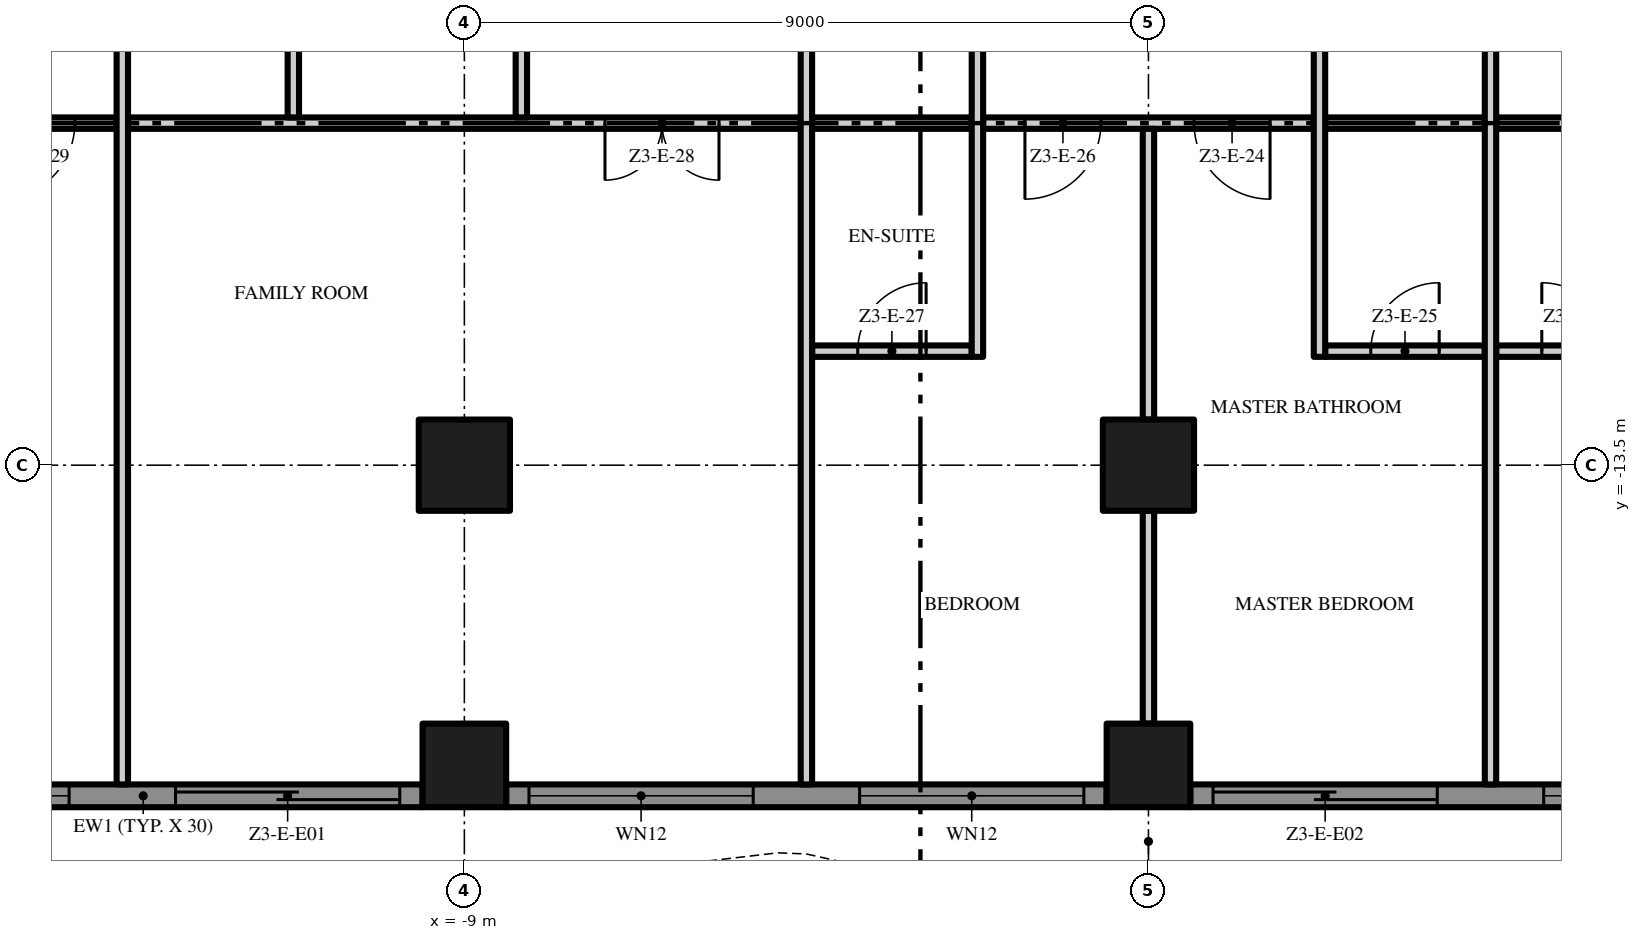
"""IFC4 building model, lengths in metres.
Left out: names, types, materials, properties, quantities, classifications, styles, units other than length and angle.
Written with IfcOpenShell. Run it as: python <this file> out.ifc"""

import sys

from ifc_helpers import new_model, si_unit, direction, frame, frame_2d, origin, origin_2d, place, context, subcontext, project, spatial, polyline, rectangle, outline, extrude, element, fill, save


model = new_model("IFC4")
c1 = context("Model", 3, precision=1e-05, world=origin(), true_north=direction((0.0, 1.0)))
c2 = subcontext(c1, "Body", "Model", "MODEL_VIEW")
j1 = project(units=[si_unit("LENGTHUNIT", "METRE"), si_unit("PLANEANGLEUNIT", "RADIAN")], contexts=[c1])
p1 = place(None, origin())
s1 = spatial("IfcSite", under=j1, at=p1, CompositionType="ELEMENT")
p2 = place(p1, origin())
s2 = spatial("IfcBuilding", under=s1, at=p2, CompositionType="ELEMENT")
p3 = place(p2, frame((0.0, 0.0, 170.6)))
s3 = spatial("IfcBuildingStorey", under=s2, at=p3, CompositionType="ELEMENT", Elevation=170.6)
p4 = place(p3, frame((-9.0, -13.5, 0.0), z_axis=(0.0, 0.0, 1.0), x_axis=(1.0, 0.0, 0.0)))
e1 = element("IfcColumn", 1, at=p4, inside=s3, PredefinedType="COLUMN", context=c2, shape_type="SweptSolid", body=[
    extrude(rectangle(XDim=1.2, YDim=1.2, at=origin_2d()), origin(), (0.0, 0.0, 1.0), 3.5),
])
p5 = place(p3, frame((-9.0, -17.45, 0.0), z_axis=(0.0, 0.0, 1.0), x_axis=(1.0, 0.0, 0.0)))
e2 = element("IfcColumn", 2, at=p5, inside=s3, PredefinedType="COLUMN", context=c2, shape_type="SweptSolid", body=[
    extrude(rectangle(XDim=1.1, YDim=1.1, at=origin_2d()), origin(), (0.0, 0.0, 1.0), 3.5),
])
p6 = place(p3, frame((0.0, -13.5, 0.0), z_axis=(0.0, 0.0, 1.0), x_axis=(1.0, 0.0, 0.0)))
e3 = element("IfcColumn", 3, at=p6, inside=s3, PredefinedType="COLUMN", context=c2, shape_type="SweptSolid", body=[
    extrude(rectangle(XDim=1.2, YDim=1.2, at=origin_2d()), origin(), (0.0, 0.0, 1.0), 3.5),
])
p7 = place(p3, frame((0.0, -17.45, 0.0), z_axis=(0.0, 0.0, 1.0), x_axis=(1.0, 0.0, 0.0)))
e4 = element("IfcColumn", 4, at=p7, inside=s3, PredefinedType="COLUMN", context=c2, shape_type="SweptSolid", body=[
    extrude(rectangle(XDim=1.1, YDim=1.1, at=origin_2d()), origin(), (0.0, 0.0, 1.0), 3.5),
])
p8 = place(p3, frame((-9.55, -17.85, 0.0), z_axis=(0.0, 0.0, 1.0), x_axis=(-1.0, 0.0, 0.0)))
e5 = element("IfcWall", 5, at=p8, inside=s3, PredefinedType="SOLIDWALL", context=c2, shape_type="SweptSolid", body=[
    extrude(rectangle(XDim=7.35, YDim=0.3, at=frame_2d((3.675, 0.0))), origin(), (0.0, 0.0, 1.0), 3.5),
])
p9 = place(p8, frame((4.65, 0.0, 0.45)))
e6 = element("IfcOpeningElement", 6, at=p9, cuts=e5, PredefinedType="OPENING", context=c2, shape_type="SweptSolid", body=[
    extrude(rectangle(XDim=2.4, YDim=2.65, at=frame_2d((1.2, 1.325))), frame((0.0, 0.16, 0.0), z_axis=(0.0, -1.0, 0.0), x_axis=(1.0, 0.0, 0.0)), (0.0, 0.0, 1.0), 0.32),
])
p10 = place(p8, frame((0.3, 0.0, 0.0)))
e7 = element("IfcOpeningElement", 7, at=p10, cuts=e5, PredefinedType="OPENING", context=c2, shape_type="SweptSolid", body=[
    extrude(rectangle(XDim=2.95, YDim=2.4, at=frame_2d((1.475, 1.2))), frame((0.0, 0.16, 0.0), z_axis=(0.0, -1.0, 0.0), x_axis=(1.0, 0.0, 0.0)), (0.0, 0.0, 1.0), 0.32),
])
p11 = place(p3, frame((-0.55, -17.85, 0.0), z_axis=(0.0, 0.0, 1.0), x_axis=(-1.0, 0.0, 0.0)))
e8 = element("IfcWall", 8, at=p11, inside=s3, PredefinedType="SOLIDWALL", context=c2, shape_type="SweptSolid", body=[
    extrude(rectangle(XDim=7.9, YDim=0.3, at=frame_2d((3.95, 0.0))), origin(), (0.0, 0.0, 1.0), 3.5),
])
p12 = place(p11, frame((4.65, 0.0, 0.45)))
e9 = element("IfcOpeningElement", 9, at=p12, cuts=e8, PredefinedType="OPENING", context=c2, shape_type="SweptSolid", body=[
    extrude(rectangle(XDim=2.95, YDim=2.65, at=frame_2d((1.475, 1.325))), frame((0.0, 0.16, 0.0), z_axis=(0.0, -1.0, 0.0), x_axis=(1.0, 0.0, 0.0)), (0.0, 0.0, 1.0), 0.32),
])
p13 = place(p11, frame((0.3, 0.0, 0.45)))
e10 = element("IfcOpeningElement", 10, at=p13, cuts=e8, PredefinedType="OPENING", context=c2, shape_type="SweptSolid", body=[
    extrude(rectangle(XDim=2.95, YDim=2.65, at=frame_2d((1.475, 1.325))), frame((0.0, 0.16, 0.0), z_axis=(0.0, -1.0, 0.0), x_axis=(1.0, 0.0, 0.0)), (0.0, 0.0, 1.0), 0.32),
])
p14 = place(p3, frame((8.45, -17.85, 0.0), z_axis=(0.0, 0.0, 1.0), x_axis=(-1.0, 0.0, 0.0)))
e11 = element("IfcWall", 11, at=p14, inside=s3, PredefinedType="SOLIDWALL", context=c2, shape_type="SweptSolid", body=[
    extrude(rectangle(XDim=7.9, YDim=0.3, at=frame_2d((3.95, 0.0))), origin(), (0.0, 0.0, 1.0), 3.5),
])
p15 = place(p14, frame((4.65, 0.0, 0.0)))
e12 = element("IfcOpeningElement", 12, at=p15, cuts=e11, PredefinedType="OPENING", context=c2, shape_type="SweptSolid", body=[
    extrude(rectangle(XDim=2.95, YDim=2.4, at=frame_2d((1.475, 1.2))), frame((0.0, 0.16, 0.0), z_axis=(0.0, -1.0, 0.0), x_axis=(1.0, 0.0, 0.0)), (0.0, 0.0, 1.0), 0.32),
])
p16 = place(p14, frame((0.3, 0.0, 0.45)))
e13 = element("IfcOpeningElement", 13, at=p16, cuts=e11, PredefinedType="OPENING", context=c2, shape_type="SweptSolid", body=[
    extrude(rectangle(XDim=2.95, YDim=2.65, at=frame_2d((1.475, 1.325))), frame((0.0, 0.16, 0.0), z_axis=(0.0, -1.0, 0.0), x_axis=(1.0, 0.0, 0.0)), (0.0, 0.0, 1.0), 0.32),
])
p17 = place(p3, origin())
e14 = element("IfcWall", 14, at=p17, inside=s3, PredefinedType="USERDEFINED", context=c2, shape_type="SweptSolid", body=[
    extrude(outline(polyline([(-18.0, -18.951), (-16.5, -19.612), (-15.0, -20.345), (-13.5, -20.869), (-12.375, -21.0), (-12.0, -20.985), (-10.5, -20.649), (-9.0, -19.988), (-7.5, -19.255), (-6.0, -18.731), (-4.875, -18.6), (-4.5, -18.615), (-3.0, -18.951), (-1.5, -19.612), (0.0, -20.345), (1.5, -20.869), (2.625, -21.0), (3.0, -20.985), (4.5, -20.649), (6.0, -19.988), (7.5, -19.255), (9.0, -18.731), (10.125, -18.6), (10.5, -18.615), (12.0, -18.951), (13.5, -19.612), (15.0, -20.345), (16.5, -20.869), (17.625, -21.0), (18.0, -20.985), (17.99, -20.735), (17.635, -20.749), (16.556, -20.624), (15.096, -20.114), (13.605, -19.385), (12.079, -18.713), (10.533, -18.366), (10.115, -18.349), (8.944, -18.486), (7.404, -19.024), (5.895, -19.761), (4.421, -20.41), (2.967, -20.736), (2.635, -20.749), (1.556, -20.624), (0.096, -20.114), (-1.395, -19.385), (-2.921, -18.713), (-4.467, -18.366), (-4.885, -18.349), (-6.056, -18.486), (-7.596, -19.024), (-9.105, -19.761), (-10.579, -20.41), (-12.033, -20.736), (-12.365, -20.749), (-13.444, -20.624), (-14.904, -20.114), (-16.395, -19.385), (-17.899, -18.723), (-18.0, -18.951)])), origin(), (0.0, 0.0, 1.0), 0.9),
])
p18 = place(p3, frame((-4.425, -12.0, 0.0), z_axis=(0.0, 0.0, 1.0), x_axis=(1.0, 0.0, 0.0)))
e15 = element("IfcWall", 15, at=p18, inside=s3, PredefinedType="PARTITIONING", context=c2, shape_type="SweptSolid", body=[
    extrude(rectangle(XDim=2.1, YDim=0.15, at=frame_2d((1.05, 0.0))), origin(), (0.0, 0.0, 1.0), 3.5),
])
p19 = place(p18, frame((0.6, 0.0, 0.0)))
e16 = element("IfcOpeningElement", 16, at=p19, cuts=e15, PredefinedType="OPENING", context=c2, shape_type="SweptSolid", body=[
    extrude(rectangle(XDim=0.9, YDim=2.1, at=frame_2d((0.45, 1.05))), frame((0.0, 0.085, 0.0), z_axis=(0.0, -1.0, 0.0), x_axis=(1.0, 0.0, 0.0)), (0.0, 0.0, 1.0), 0.17),
])
p20 = place(p3, frame((2.325, -12.0, 0.0), z_axis=(0.0, 0.0, 1.0), x_axis=(1.0, 0.0, 0.0)))
e17 = element("IfcWall", 17, at=p20, inside=s3, PredefinedType="PARTITIONING", context=c2, shape_type="SweptSolid", body=[
    extrude(rectangle(XDim=2.1, YDim=0.15, at=frame_2d((1.05, 0.0))), origin(), (0.0, 0.0, 1.0), 3.5),
])
p21 = place(p20, frame((0.6, 0.0, 0.0)))
e18 = element("IfcOpeningElement", 18, at=p21, cuts=e17, PredefinedType="OPENING", context=c2, shape_type="SweptSolid", body=[
    extrude(rectangle(XDim=0.9, YDim=2.1, at=frame_2d((0.45, 1.05))), frame((0.0, 0.085, 0.0), z_axis=(0.0, -1.0, 0.0), x_axis=(1.0, 0.0, 0.0)), (0.0, 0.0, 1.0), 0.17),
])
p22 = place(p3, frame((4.575, -12.0, 0.0), z_axis=(0.0, 0.0, 1.0), x_axis=(1.0, 0.0, 0.0)))
e19 = element("IfcWall", 19, at=p22, inside=s3, PredefinedType="PARTITIONING", context=c2, shape_type="SweptSolid", body=[
    extrude(rectangle(XDim=2.1, YDim=0.15, at=frame_2d((1.05, 0.0))), origin(), (0.0, 0.0, 1.0), 3.5),
])
p23 = place(p22, frame((0.6, 0.0, 0.0)))
e20 = element("IfcOpeningElement", 20, at=p23, cuts=e19, PredefinedType="OPENING", context=c2, shape_type="SweptSolid", body=[
    extrude(rectangle(XDim=0.9, YDim=2.1, at=frame_2d((0.45, 1.05))), frame((0.0, 0.085, 0.0), z_axis=(0.0, -1.0, 0.0), x_axis=(1.0, 0.0, 0.0)), (0.0, 0.0, 1.0), 0.17),
])
p24 = place(p3, frame((-13.575, -9.0, 0.0), z_axis=(0.0, 0.0, 1.0), x_axis=(-1.0, 0.0, 0.0)))
e21 = element("IfcWall", 21, at=p24, inside=s3, PredefinedType="PARTITIONING", context=c2, shape_type="SweptSolid", body=[
    extrude(rectangle(XDim=2.1, YDim=0.15, at=frame_2d((1.05, 0.0))), origin(), (0.0, 0.0, 1.0), 3.5),
])
p25 = place(p24, frame((0.55, 0.0, 0.0)))
e22 = element("IfcOpeningElement", 22, at=p25, cuts=e21, PredefinedType="OPENING", context=c2, shape_type="SweptSolid", body=[
    extrude(rectangle(XDim=1.0, YDim=2.4, at=frame_2d((0.5, 1.2))), frame((0.0, 0.085, 0.0), z_axis=(0.0, -1.0, 0.0), x_axis=(1.0, 0.0, 0.0)), (0.0, 0.0, 1.0), 0.17),
])
p26 = place(p3, frame((-4.575, -9.0, 0.0), z_axis=(0.0, 0.0, 1.0), x_axis=(-1.0, 0.0, 0.0)))
e23 = element("IfcWall", 23, at=p26, inside=s3, PredefinedType="PARTITIONING", context=c2, shape_type="SweptSolid", body=[
    extrude(rectangle(XDim=8.85, YDim=0.15, at=frame_2d((4.425, 0.0))), origin(), (0.0, 0.0, 1.0), 3.5),
])
p27 = place(p26, frame((1.075, 0.0, 0.0)))
e24 = element("IfcOpeningElement", 24, at=p27, cuts=e23, PredefinedType="OPENING", context=c2, shape_type="SweptSolid", body=[
    extrude(rectangle(XDim=1.5, YDim=2.4, at=frame_2d((0.75, 1.2))), frame((0.0, 0.085, 0.0), z_axis=(0.0, -1.0, 0.0), x_axis=(1.0, 0.0, 0.0)), (0.0, 0.0, 1.0), 0.17),
])
p28 = place(p3, frame((-4.425, -9.0, 0.0), z_axis=(0.0, 0.0, 1.0), x_axis=(1.0, 0.0, 0.0)))
e25 = element("IfcWall", 25, at=p28, inside=s3, PredefinedType="PARTITIONING", context=c2, shape_type="SweptSolid", body=[
    extrude(rectangle(XDim=2.1, YDim=0.15, at=frame_2d((1.05, 0.0))), origin(), (0.0, 0.0, 1.0), 3.5),
])
p29 = place(p3, frame((2.175, -9.0, 0.0), z_axis=(0.0, 0.0, 1.0), x_axis=(-1.0, 0.0, 0.0)))
e26 = element("IfcWall", 26, at=p29, inside=s3, PredefinedType="PARTITIONING", context=c2, shape_type="SweptSolid", body=[
    extrude(rectangle(XDim=4.35, YDim=0.15, at=frame_2d((2.175, 0.0))), origin(), (0.0, 0.0, 1.0), 3.5),
])
p30 = place(p29, frame((0.575, 0.0, 0.0)))
e27 = element("IfcOpeningElement", 27, at=p30, cuts=e26, PredefinedType="OPENING", context=c2, shape_type="SweptSolid", body=[
    extrude(rectangle(XDim=1.0, YDim=2.4, at=frame_2d((0.5, 1.2))), frame((0.0, 0.085, 0.0), z_axis=(0.0, -1.0, 0.0), x_axis=(1.0, 0.0, 0.0)), (0.0, 0.0, 1.0), 0.17),
])
p31 = place(p29, frame((2.8, 0.0, 0.0)))
e28 = element("IfcOpeningElement", 28, at=p31, cuts=e26, PredefinedType="OPENING", context=c2, shape_type="SweptSolid", body=[
    extrude(rectangle(XDim=1.0, YDim=2.4, at=frame_2d((0.5, 1.2))), frame((0.0, 0.085, 0.0), z_axis=(0.0, -1.0, 0.0), x_axis=(1.0, 0.0, 0.0)), (0.0, 0.0, 1.0), 0.17),
])
for number, where, z_axis, x_axis in (
    (29, (2.325, -9.0, 0.0), (0.0, 0.0, 1.0), (1.0, 0.0, 0.0)),
    (30, (4.575, -9.0, 0.0), (0.0, 0.0, 1.0), (1.0, 0.0, 0.0)),
):
    element("IfcWall", number, at=place(p3, frame(where, z_axis=z_axis, x_axis=x_axis)), inside=s3, PredefinedType="PARTITIONING", context=c2, shape_type="SweptSolid", body=[
        extrude(rectangle(XDim=2.1, YDim=0.15, at=frame_2d((1.05, 0.0))), origin(), (0.0, 0.0, 1.0), 3.5),
    ])
p32 = place(p3, frame((-13.5, -17.7, 0.0), z_axis=(0.0, 0.0, 1.0), x_axis=(0.0, 1.0, 0.0)))
e31 = element("IfcWall", 31, at=p32, inside=s3, PredefinedType="PARTITIONING", context=c2, shape_type="SweptSolid", body=[
    extrude(rectangle(XDim=13.275, YDim=0.15, at=frame_2d((6.638, 0.0))), origin(), (0.0, 0.0, 1.0), 3.5),
])
p33 = place(p3, frame((-11.25, -8.925, 0.0), z_axis=(0.0, 0.0, 1.0), x_axis=(0.0, 1.0, 0.0)))
e32 = element("IfcWall", 32, at=p33, inside=s3, PredefinedType="PARTITIONING", context=c2, shape_type="SweptSolid", body=[
    extrude(rectangle(XDim=4.35, YDim=0.15, at=frame_2d((2.175, 0.0))), origin(), (0.0, 0.0, 1.0), 3.5),
])
p34 = place(p3, frame((-8.25, -8.925, 0.0), z_axis=(0.0, 0.0, 1.0), x_axis=(0.0, 1.0, 0.0)))
e33 = element("IfcWall", 33, at=p34, inside=s3, PredefinedType="PARTITIONING", context=c2, shape_type="SweptSolid", body=[
    extrude(rectangle(XDim=4.5, YDim=0.15, at=frame_2d((2.25, 0.0))), origin(), (0.0, 0.0, 1.0), 3.5),
])
p35 = place(p3, frame((-4.5, -17.7, 0.0), z_axis=(0.0, 0.0, 1.0), x_axis=(0.0, 1.0, 0.0)))
e34 = element("IfcWall", 34, at=p35, inside=s3, PredefinedType="PARTITIONING", context=c2, shape_type="SweptSolid", body=[
    extrude(rectangle(XDim=13.275, YDim=0.15, at=frame_2d((6.638, 0.0))), origin(), (0.0, 0.0, 1.0), 3.5),
])
p36 = place(p3, frame((-2.25, -12.075, 0.0), z_axis=(0.0, 0.0, 1.0), x_axis=(0.0, 1.0, 0.0)))
e35 = element("IfcWall", 35, at=p36, inside=s3, PredefinedType="PARTITIONING", context=c2, shape_type="SweptSolid", body=[
    extrude(rectangle(XDim=7.65, YDim=0.15, at=frame_2d((3.825, 0.0))), origin(), (0.0, 0.0, 1.0), 3.5),
])
p37 = place(p3, frame((0.0, -16.9, 0.0), z_axis=(0.0, 0.0, 1.0), x_axis=(0.0, 1.0, 0.0)))
e36 = element("IfcWall", 36, at=p37, inside=s3, PredefinedType="PARTITIONING", context=c2, shape_type="SweptSolid", body=[
    extrude(rectangle(XDim=2.8, YDim=0.15, at=frame_2d((1.4, 0.0))), origin(), (0.0, 0.0, 1.0), 3.5),
])
p38 = place(p3, frame((0.0, -12.9, 0.0), z_axis=(0.0, 0.0, 1.0), x_axis=(0.0, 1.0, 0.0)))
e37 = element("IfcWall", 37, at=p38, inside=s3, PredefinedType="PARTITIONING", context=c2, shape_type="SweptSolid", body=[
    extrude(rectangle(XDim=3.825, YDim=0.15, at=frame_2d((1.913, 0.0))), origin(), (0.0, 0.0, 1.0), 3.5),
])
p39 = place(p3, frame((2.25, -4.425, 0.0), z_axis=(0.0, 0.0, 1.0), x_axis=(0.0, -1.0, 0.0)))
e38 = element("IfcWall", 38, at=p39, inside=s3, PredefinedType="PARTITIONING", context=c2, shape_type="SweptSolid", body=[
    extrude(rectangle(XDim=7.65, YDim=0.15, at=frame_2d((3.825, 0.0))), origin(), (0.0, 0.0, 1.0), 3.5),
])
p40 = place(p39, frame((1.875, 0.0, 0.0)))
e39 = element("IfcOpeningElement", 39, at=p40, cuts=e38, PredefinedType="OPENING", context=c2, shape_type="SweptSolid", body=[
    extrude(rectangle(XDim=0.9, YDim=2.1, at=frame_2d((0.45, 1.05))), frame((0.0, 0.085, 0.0), z_axis=(0.0, -1.0, 0.0), x_axis=(1.0, 0.0, 0.0)), (0.0, 0.0, 1.0), 0.17),
])
p41 = place(p3, frame((4.5, -17.7, 0.0), z_axis=(0.0, 0.0, 1.0), x_axis=(0.0, 1.0, 0.0)))
e40 = element("IfcWall", 40, at=p41, inside=s3, PredefinedType="PARTITIONING", context=c2, shape_type="SweptSolid", body=[
    extrude(rectangle(XDim=13.125, YDim=0.15, at=frame_2d((6.562, 0.0))), origin(), (0.0, 0.0, 1.0), 3.5),
])
p42 = place(p9, origin())
e41 = element("IfcWindow", 41, at=p42, inside=s3, PartitioningType="SINGLE_PANEL", PredefinedType="WINDOW", context=c2, shape_type="SweptSolid", body=[
    extrude(rectangle(XDim=2.4, YDim=2.65, at=frame_2d((1.2, 1.325))), frame((0.0, 0.03, 0.0), z_axis=(0.0, -1.0, 0.0), x_axis=(1.0, 0.0, 0.0)), (0.0, 0.0, 1.0), 0.06),
])
fill(e6, e41)
p43 = place(p10, origin())
e42 = element("IfcDoor", 42, at=p43, inside=s3, OperationType="SINGLE_SWING_LEFT", PredefinedType="DOOR", context=c2, shape_type="SweptSolid", body=[
    extrude(rectangle(XDim=2.95, YDim=2.4, at=frame_2d((1.475, 1.2))), frame((0.0, 0.025, 0.0), z_axis=(0.0, -1.0, 0.0), x_axis=(1.0, 0.0, 0.0)), (0.0, 0.0, 1.0), 0.05),
])
fill(e7, e42)
p44 = place(p12, origin())
e43 = element("IfcWindow", 43, at=p44, inside=s3, PartitioningType="SINGLE_PANEL", PredefinedType="WINDOW", context=c2, shape_type="SweptSolid", body=[
    extrude(rectangle(XDim=2.95, YDim=2.65, at=frame_2d((1.475, 1.325))), frame((0.0, 0.03, 0.0), z_axis=(0.0, -1.0, 0.0), x_axis=(1.0, 0.0, 0.0)), (0.0, 0.0, 1.0), 0.06),
])
fill(e9, e43)
p45 = place(p13, origin())
e44 = element("IfcWindow", 44, at=p45, inside=s3, PartitioningType="SINGLE_PANEL", PredefinedType="WINDOW", context=c2, shape_type="SweptSolid", body=[
    extrude(rectangle(XDim=2.95, YDim=2.65, at=frame_2d((1.475, 1.325))), frame((0.0, 0.03, 0.0), z_axis=(0.0, -1.0, 0.0), x_axis=(1.0, 0.0, 0.0)), (0.0, 0.0, 1.0), 0.06),
])
fill(e10, e44)
p46 = place(p15, origin())
e45 = element("IfcDoor", 45, at=p46, inside=s3, OperationType="SINGLE_SWING_LEFT", PredefinedType="DOOR", context=c2, shape_type="SweptSolid", body=[
    extrude(rectangle(XDim=2.95, YDim=2.4, at=frame_2d((1.475, 1.2))), frame((0.0, 0.025, 0.0), z_axis=(0.0, -1.0, 0.0), x_axis=(1.0, 0.0, 0.0)), (0.0, 0.0, 1.0), 0.05),
])
fill(e12, e45)
p47 = place(p16, origin())
e46 = element("IfcWindow", 46, at=p47, inside=s3, PartitioningType="SINGLE_PANEL", PredefinedType="WINDOW", context=c2, shape_type="SweptSolid", body=[
    extrude(rectangle(XDim=2.95, YDim=2.65, at=frame_2d((1.475, 1.325))), frame((0.0, 0.03, 0.0), z_axis=(0.0, -1.0, 0.0), x_axis=(1.0, 0.0, 0.0)), (0.0, 0.0, 1.0), 0.06),
])
fill(e13, e46)
p48 = place(p23, origin())
e47 = element("IfcDoor", 47, at=p48, inside=s3, OperationType="SINGLE_SWING_LEFT", PredefinedType="DOOR", context=c2, shape_type="SweptSolid", body=[
    extrude(rectangle(XDim=0.9, YDim=2.1, at=frame_2d((0.45, 1.05))), frame((0.0, 0.025, 0.0), z_axis=(0.0, -1.0, 0.0), x_axis=(1.0, 0.0, 0.0)), (0.0, 0.0, 1.0), 0.05),
])
fill(e20, e47)
p49 = place(p30, origin())
e48 = element("IfcDoor", 48, at=p49, inside=s3, OperationType="SINGLE_SWING_LEFT", PredefinedType="DOOR", context=c2, shape_type="SweptSolid", body=[
    extrude(rectangle(XDim=1.0, YDim=2.4, at=frame_2d((0.5, 1.2))), frame((0.0, 0.025, 0.0), z_axis=(0.0, -1.0, 0.0), x_axis=(1.0, 0.0, 0.0)), (0.0, 0.0, 1.0), 0.05),
])
fill(e27, e48)
p50 = place(p21, origin())
e49 = element("IfcDoor", 49, at=p50, inside=s3, OperationType="SINGLE_SWING_RIGHT", PredefinedType="DOOR", context=c2, shape_type="SweptSolid", body=[
    extrude(rectangle(XDim=0.9, YDim=2.1, at=frame_2d((0.45, 1.05))), frame((0.0, 0.025, 0.0), z_axis=(0.0, -1.0, 0.0), x_axis=(1.0, 0.0, 0.0)), (0.0, 0.0, 1.0), 0.05),
])
fill(e18, e49)
p51 = place(p31, origin())
e50 = element("IfcDoor", 50, at=p51, inside=s3, OperationType="SINGLE_SWING_RIGHT", PredefinedType="DOOR", context=c2, shape_type="SweptSolid", body=[
    extrude(rectangle(XDim=1.0, YDim=2.4, at=frame_2d((0.5, 1.2))), frame((0.0, 0.025, 0.0), z_axis=(0.0, -1.0, 0.0), x_axis=(1.0, 0.0, 0.0)), (0.0, 0.0, 1.0), 0.05),
])
fill(e28, e50)
p52 = place(p19, origin())
e51 = element("IfcDoor", 51, at=p52, inside=s3, OperationType="SINGLE_SWING_RIGHT", PredefinedType="DOOR", context=c2, shape_type="SweptSolid", body=[
    extrude(rectangle(XDim=0.9, YDim=2.1, at=frame_2d((0.45, 1.05))), frame((0.0, 0.025, 0.0), z_axis=(0.0, -1.0, 0.0), x_axis=(1.0, 0.0, 0.0)), (0.0, 0.0, 1.0), 0.05),
])
fill(e16, e51)
p53 = place(p27, origin())
e52 = element("IfcDoor", 52, at=p53, inside=s3, OperationType="DOUBLE_DOOR_SINGLE_SWING", PredefinedType="DOOR", context=c2, shape_type="SweptSolid", body=[
    extrude(rectangle(XDim=1.5, YDim=2.4, at=frame_2d((0.75, 1.2))), frame((0.0, 0.025, 0.0), z_axis=(0.0, -1.0, 0.0), x_axis=(1.0, 0.0, 0.0)), (0.0, 0.0, 1.0), 0.05),
])
fill(e24, e52)
p54 = place(p25, origin())
e53 = element("IfcDoor", 53, at=p54, inside=s3, OperationType="SINGLE_SWING_RIGHT", PredefinedType="DOOR", context=c2, shape_type="SweptSolid", body=[
    extrude(rectangle(XDim=1.0, YDim=2.4, at=frame_2d((0.5, 1.2))), frame((0.0, 0.025, 0.0), z_axis=(0.0, -1.0, 0.0), x_axis=(1.0, 0.0, 0.0)), (0.0, 0.0, 1.0), 0.05),
])
fill(e22, e53)
save(model, sys.argv[1])
